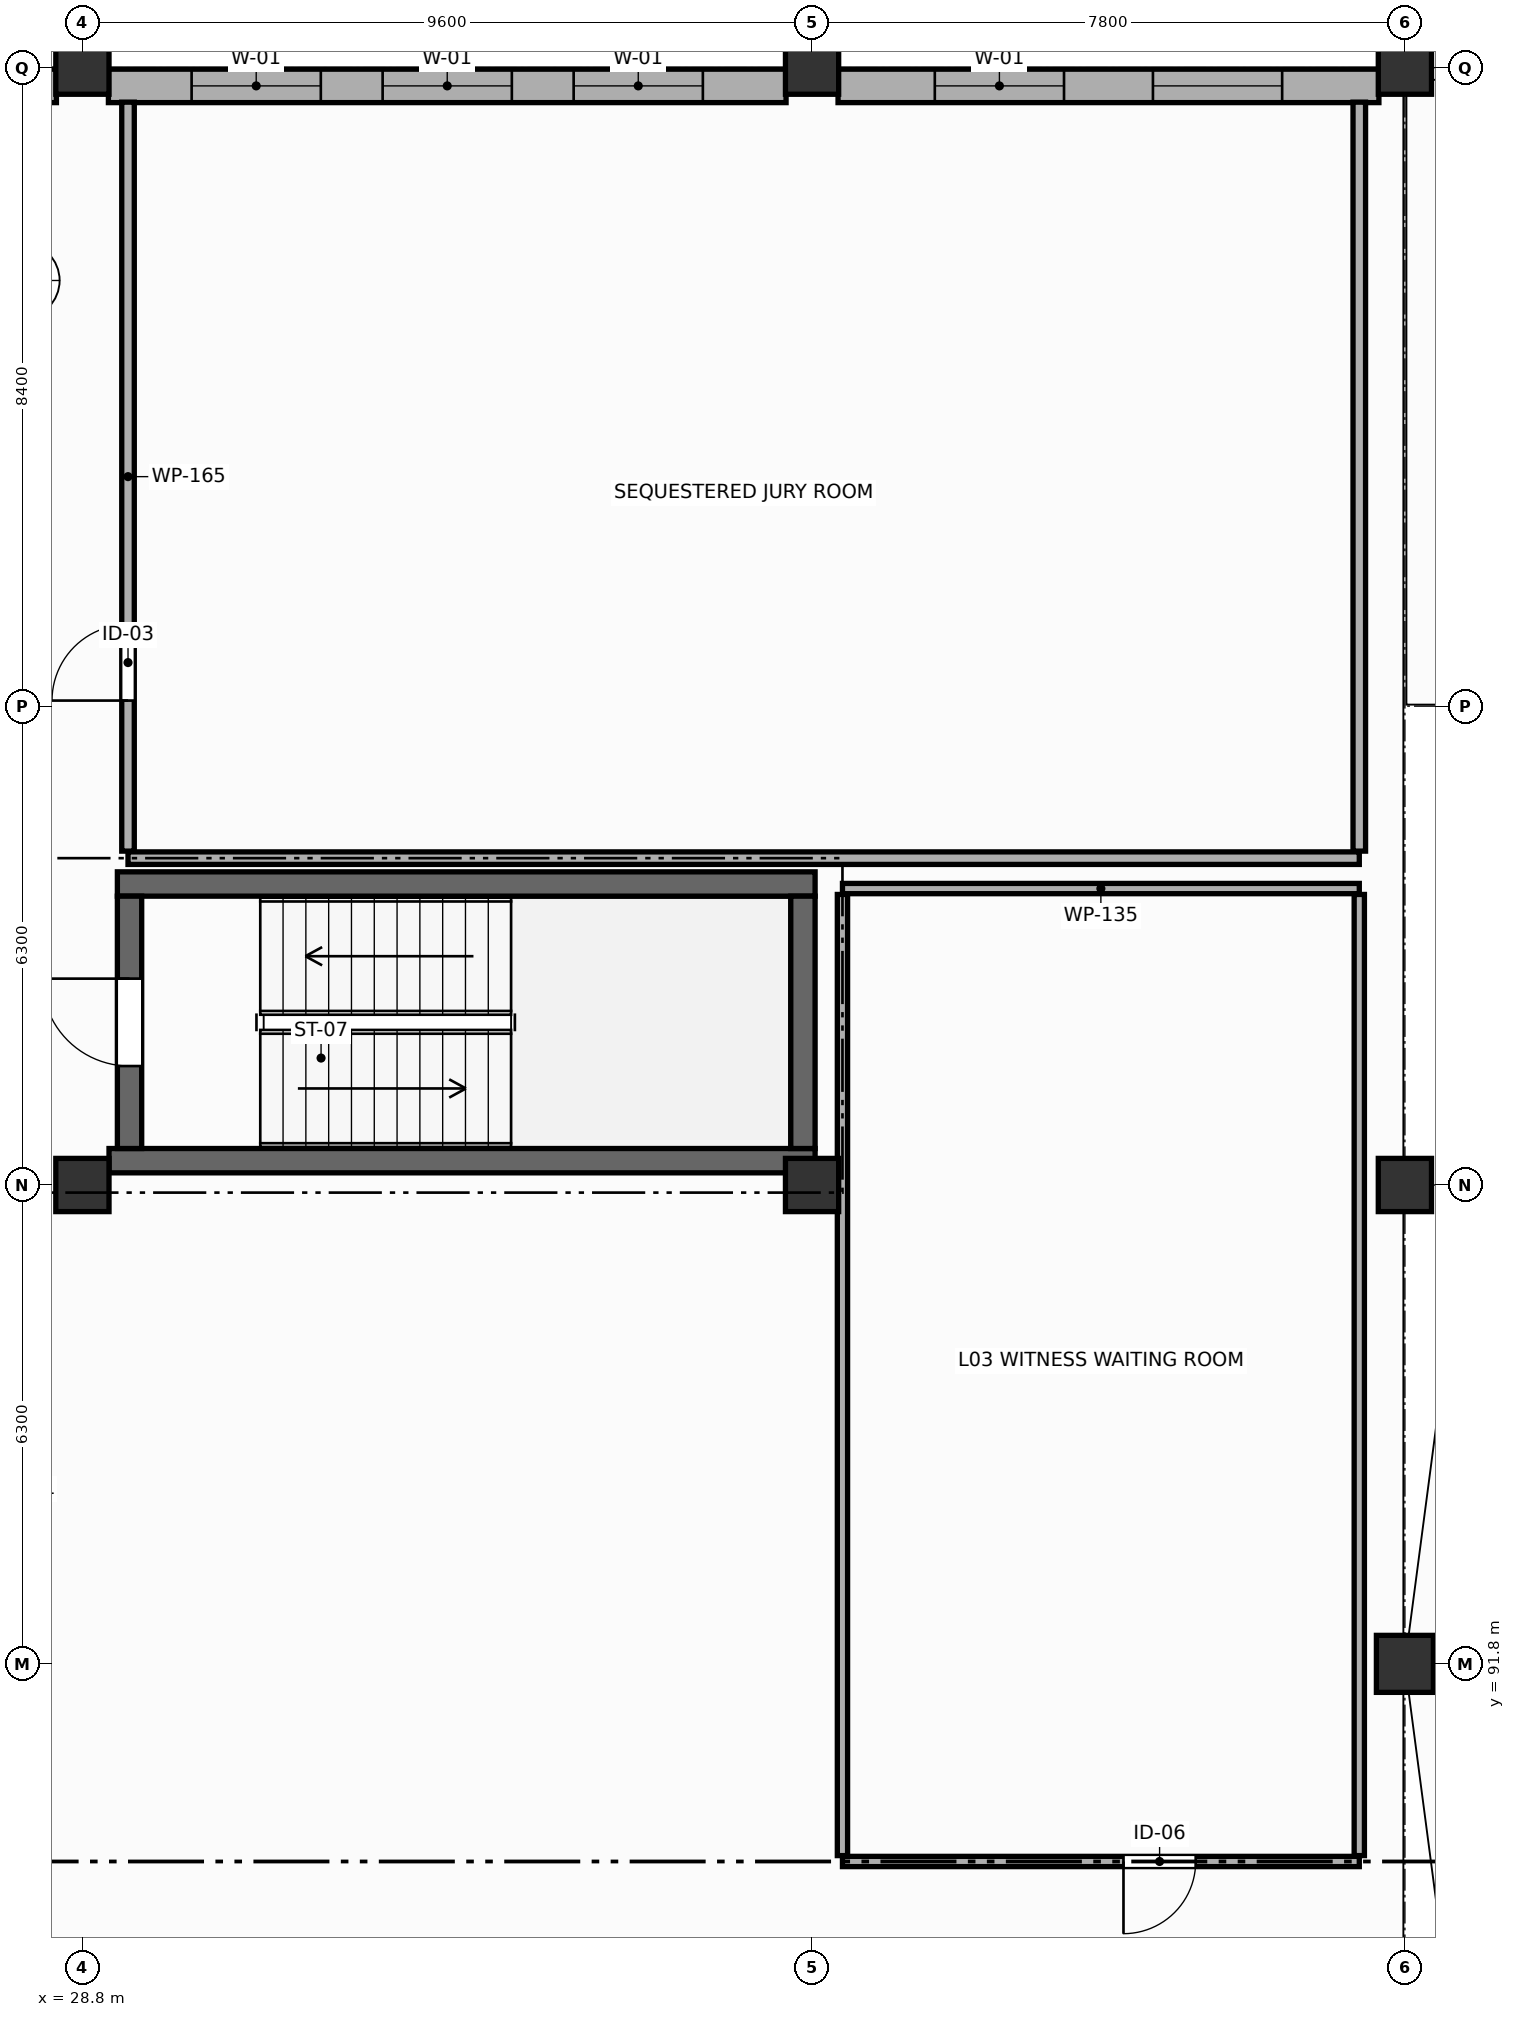
"""IFC4 building model, lengths in metres.
Left out: names, types, materials, properties, quantities, classifications, styles, units other than length and angle.
Written with IfcOpenShell. Run it as: python <this file> out.ifc"""

import sys

from ifc_helpers import new_model, si_unit, direction, frame, frame_2d, origin, origin_2d, place, context, subcontext, project, spatial, rectangle, circle, extrude, element, fill, save


model = new_model("IFC4")
c1 = context("Model", 3, precision=1e-05, world=origin(), true_north=direction((0.0, 1.0)))
c2 = subcontext(c1, "Body", "Model", "MODEL_VIEW")
j1 = project(units=[si_unit("LENGTHUNIT", "METRE"), si_unit("PLANEANGLEUNIT", "RADIAN")], contexts=[c1])
p1 = place(None, origin())
s1 = spatial("IfcSite", under=j1, at=p1, CompositionType="ELEMENT")
p2 = place(p1, origin())
s2 = spatial("IfcBuilding", under=s1, at=p2, CompositionType="ELEMENT")
p3 = place(p2, frame((0.0, 0.0, 9.9)))
s3 = spatial("IfcBuildingStorey", under=s2, at=p3, CompositionType="ELEMENT", Elevation=9.9)
p4 = place(p3, frame((46.2, 91.8, 0.0), z_axis=(0.0, 0.0, 1.0), x_axis=(1.0, 0.0, 0.0)))
e1 = element("IfcColumn", 1, at=p4, inside=s3, PredefinedType="COLUMN", context=c2, shape_type="SweptSolid", body=[
    extrude(circle(Radius=0.375, at=origin_2d()), origin(), (0.0, 0.0, 1.0), 4.5),
])
for number, where, z_axis, x_axis in (
    (2, (28.8, 98.1, 0.0), (0.0, 0.0, 1.0), (1.0, 0.0, 0.0)),
    (3, (28.8, 112.8, 0.0), (0.0, 0.0, 1.0), (1.0, 0.0, 0.0)),
    (4, (38.4, 98.1, 0.0), (0.0, 0.0, 1.0), (1.0, 0.0, 0.0)),
    (5, (38.4, 112.8, 0.0), (0.0, 0.0, 1.0), (1.0, 0.0, 0.0)),
    (6, (46.2, 98.1, 0.0), (0.0, 0.0, 1.0), (1.0, 0.0, 0.0)),
    (7, (46.2, 112.8, 0.0), (0.0, 0.0, 1.0), (1.0, 0.0, 0.0)),
):
    element("IfcColumn", number, at=place(p3, frame(where, z_axis=z_axis, x_axis=x_axis)), inside=s3, PredefinedType="COLUMN", context=c2, shape_type="SweptSolid", body=[
        extrude(rectangle(XDim=0.7, YDim=0.7, at=origin_2d()), origin(), (0.0, 0.0, 1.0), 4.5),
    ])
p5 = place(p3, frame((19.542, 112.56, 0.0), z_axis=(0.0, 0.0, 1.0), x_axis=(1.0, 0.0, 0.0)))
e8 = element("IfcWall", 8, at=p5, inside=s3, PredefinedType="STANDARD", context=c2, shape_type="SweptSolid", body=[
    extrude(rectangle(XDim=8.916, YDim=0.44, at=frame_2d((4.458, 0.0))), origin(), (0.0, 0.0, 1.0), 3.33),
])
p6 = place(p5, frame((1.095, 0.0, 0.85)))
e9 = element("IfcOpeningElement", 9, at=p6, cuts=e8, PredefinedType="OPENING", context=c2, shape_type="SweptSolid", body=[
    extrude(rectangle(XDim=1.7, YDim=2.3, at=frame_2d((0.85, 1.15))), frame((0.0, 0.23, 0.0), z_axis=(0.0, -1.0, 0.0), x_axis=(1.0, 0.0, 0.0)), (0.0, 0.0, 1.0), 0.46),
])
p7 = place(p5, frame((3.608, 0.0, 0.85)))
e10 = element("IfcOpeningElement", 10, at=p7, cuts=e8, PredefinedType="OPENING", context=c2, shape_type="SweptSolid", body=[
    extrude(rectangle(XDim=1.7, YDim=2.3, at=frame_2d((0.85, 1.15))), frame((0.0, 0.23, 0.0), z_axis=(0.0, -1.0, 0.0), x_axis=(1.0, 0.0, 0.0)), (0.0, 0.0, 1.0), 0.46),
])
p8 = place(p5, frame((6.121, 0.0, 0.85)))
e11 = element("IfcOpeningElement", 11, at=p8, cuts=e8, PredefinedType="OPENING", context=c2, shape_type="SweptSolid", body=[
    extrude(rectangle(XDim=1.7, YDim=2.3, at=frame_2d((0.85, 1.15))), frame((0.0, 0.23, 0.0), z_axis=(0.0, -1.0, 0.0), x_axis=(1.0, 0.0, 0.0)), (0.0, 0.0, 1.0), 0.46),
])
p9 = place(p3, frame((29.142, 112.56, 0.0), z_axis=(0.0, 0.0, 1.0), x_axis=(1.0, 0.0, 0.0)))
e12 = element("IfcWall", 12, at=p9, inside=s3, PredefinedType="STANDARD", context=c2, shape_type="SweptSolid", body=[
    extrude(rectangle(XDim=8.916, YDim=0.44, at=frame_2d((4.458, 0.0))), origin(), (0.0, 0.0, 1.0), 3.33),
])
p10 = place(p9, frame((1.095, 0.0, 0.85)))
e13 = element("IfcOpeningElement", 13, at=p10, cuts=e12, PredefinedType="OPENING", context=c2, shape_type="SweptSolid", body=[
    extrude(rectangle(XDim=1.7, YDim=2.3, at=frame_2d((0.85, 1.15))), frame((0.0, 0.23, 0.0), z_axis=(0.0, -1.0, 0.0), x_axis=(1.0, 0.0, 0.0)), (0.0, 0.0, 1.0), 0.46),
])
p11 = place(p9, frame((3.608, 0.0, 0.85)))
e14 = element("IfcOpeningElement", 14, at=p11, cuts=e12, PredefinedType="OPENING", context=c2, shape_type="SweptSolid", body=[
    extrude(rectangle(XDim=1.7, YDim=2.3, at=frame_2d((0.85, 1.15))), frame((0.0, 0.23, 0.0), z_axis=(0.0, -1.0, 0.0), x_axis=(1.0, 0.0, 0.0)), (0.0, 0.0, 1.0), 0.46),
])
p12 = place(p9, frame((6.121, 0.0, 0.85)))
e15 = element("IfcOpeningElement", 15, at=p12, cuts=e12, PredefinedType="OPENING", context=c2, shape_type="SweptSolid", body=[
    extrude(rectangle(XDim=1.7, YDim=2.3, at=frame_2d((0.85, 1.15))), frame((0.0, 0.23, 0.0), z_axis=(0.0, -1.0, 0.0), x_axis=(1.0, 0.0, 0.0)), (0.0, 0.0, 1.0), 0.46),
])
p13 = place(p3, frame((38.742, 112.56, 0.0), z_axis=(0.0, 0.0, 1.0), x_axis=(1.0, 0.0, 0.0)))
e16 = element("IfcWall", 16, at=p13, inside=s3, PredefinedType="STANDARD", context=c2, shape_type="SweptSolid", body=[
    extrude(rectangle(XDim=7.116, YDim=0.44, at=frame_2d((3.558, 0.0))), origin(), (0.0, 0.0, 1.0), 3.33),
])
p14 = place(p13, frame((1.273, 0.0, 0.85)))
e17 = element("IfcOpeningElement", 17, at=p14, cuts=e16, PredefinedType="OPENING", context=c2, shape_type="SweptSolid", body=[
    extrude(rectangle(XDim=1.7, YDim=2.3, at=frame_2d((0.85, 1.15))), frame((0.0, 0.23, 0.0), z_axis=(0.0, -1.0, 0.0), x_axis=(1.0, 0.0, 0.0)), (0.0, 0.0, 1.0), 0.46),
])
p15 = place(p13, frame((4.143, 0.0, 0.85)))
e18 = element("IfcOpeningElement", 18, at=p15, cuts=e16, PredefinedType="OPENING", context=c2, shape_type="SweptSolid", body=[
    extrude(rectangle(XDim=1.7, YDim=2.3, at=frame_2d((0.85, 1.15))), frame((0.0, 0.23, 0.0), z_axis=(0.0, -1.0, 0.0), x_axis=(1.0, 0.0, 0.0)), (0.0, 0.0, 1.0), 0.46),
])
p16 = place(p3, frame((29.26, 102.06, 0.0), z_axis=(0.0, 0.0, 1.0), x_axis=(1.0, 0.0, 0.0)))
e19 = element("IfcWall", 19, at=p16, inside=s3, PredefinedType="SHEAR", context=c2, shape_type="SweptSolid", body=[
    extrude(rectangle(XDim=9.18, YDim=0.32, at=frame_2d((4.59, 0.0))), origin(), (0.0, 0.0, 1.0), 4.25),
])
p17 = place(p3, frame((38.44, 98.42, 0.0), z_axis=(0.0, 0.0, 1.0), x_axis=(-1.0, 0.0, 0.0)))
e20 = element("IfcWall", 20, at=p17, inside=s3, PredefinedType="SHEAR", context=c2, shape_type="SweptSolid", body=[
    extrude(rectangle(XDim=9.29, YDim=0.32, at=frame_2d((4.645, 0.0))), origin(), (0.0, 0.0, 1.0), 4.25),
])
p18 = place(p3, frame((29.42, 98.58, 0.0), z_axis=(0.0, 0.0, 1.0), x_axis=(0.0, 1.0, 0.0)))
e21 = element("IfcWall", 21, at=p18, inside=s3, PredefinedType="SHEAR", context=c2, shape_type="SweptSolid", body=[
    extrude(rectangle(XDim=3.32, YDim=0.32, at=frame_2d((1.66, 0.0))), origin(), (0.0, 0.0, 1.0), 4.25),
])
p19 = place(p18, frame((1.085, 0.0, 0.0)))
e22 = element("IfcOpeningElement", 22, at=p19, cuts=e21, PredefinedType="OPENING", context=c2, shape_type="SweptSolid", body=[
    extrude(rectangle(XDim=1.15, YDim=2.2, at=frame_2d((0.575, 1.1))), frame((0.0, 0.17, 0.0), z_axis=(0.0, -1.0, 0.0), x_axis=(1.0, 0.0, 0.0)), (0.0, 0.0, 1.0), 0.34),
])
p20 = place(p3, frame((38.28, 101.9, 0.0), z_axis=(0.0, 0.0, 1.0), x_axis=(0.0, -1.0, 0.0)))
e23 = element("IfcWall", 23, at=p20, inside=s3, PredefinedType="SHEAR", context=c2, shape_type="SweptSolid", body=[
    extrude(rectangle(XDim=3.32, YDim=0.32, at=frame_2d((1.66, 0.0))), origin(), (0.0, 0.0, 1.0), 4.25),
])
p21 = place(p3, frame((45.6, 102.4, 0.0), z_axis=(0.0, 0.0, 1.0), x_axis=(-1.0, 0.0, 0.0)))
e24 = element("IfcWall", 24, at=p21, inside=s3, PredefinedType="PARTITIONING", context=c2, shape_type="SweptSolid", body=[
    extrude(rectangle(XDim=16.2, YDim=0.165, at=frame_2d((8.1, 0.0))), origin(), (0.0, 0.0, 1.0), 3.33),
])
p22 = place(p3, frame((29.4, 102.492, 0.0), z_axis=(0.0, 0.0, 1.0), x_axis=(0.0, 1.0, 0.0)))
e25 = element("IfcWall", 25, at=p22, inside=s3, PredefinedType="PARTITIONING", context=c2, shape_type="SweptSolid", body=[
    extrude(rectangle(XDim=9.854, YDim=0.165, at=frame_2d((4.927, 0.0))), origin(), (0.0, 0.0, 1.0), 3.63),
])
p23 = place(p22, frame((1.981, 0.0, 0.0)))
e26 = element("IfcOpeningElement", 26, at=p23, cuts=e25, PredefinedType="OPENING", context=c2, shape_type="SweptSolid", body=[
    extrude(rectangle(XDim=1.0, YDim=2.15, at=frame_2d((0.5, 1.075))), frame((0.0, 0.093, 0.0), z_axis=(0.0, -1.0, 0.0), x_axis=(1.0, 0.0, 0.0)), (0.0, 0.0, 1.0), 0.185),
])
p24 = place(p3, frame((45.6, 112.346, 0.0), z_axis=(0.0, 0.0, 1.0), x_axis=(0.0, -1.0, 0.0)))
e27 = element("IfcWall", 27, at=p24, inside=s3, PredefinedType="PARTITIONING", context=c2, shape_type="SweptSolid", body=[
    extrude(rectangle(XDim=9.854, YDim=0.165, at=frame_2d((4.927, 0.0))), origin(), (0.0, 0.0, 1.0), 3.63),
])
p25 = place(p3, frame((38.8, 102.0, 0.0), z_axis=(0.0, 0.0, 1.0), x_axis=(1.0, 0.0, 0.0)))
e28 = element("IfcWall", 28, at=p25, inside=s3, PredefinedType="PARTITIONING", context=c2, shape_type="SweptSolid", body=[
    extrude(rectangle(XDim=6.8, YDim=0.135, at=frame_2d((3.4, 0.0))), origin(), (0.0, 0.0, 1.0), 3.33),
])
p26 = place(p3, frame((45.6, 89.2, 0.0), z_axis=(0.0, 0.0, 1.0), x_axis=(-1.0, 0.0, 0.0)))
e29 = element("IfcWall", 29, at=p26, inside=s3, PredefinedType="PARTITIONING", context=c2, shape_type="SweptSolid", body=[
    extrude(rectangle(XDim=6.8, YDim=0.135, at=frame_2d((3.4, 0.0))), origin(), (0.0, 0.0, 1.0), 3.38),
])
p27 = place(p26, frame((2.153, 0.0, 0.0)))
e30 = element("IfcOpeningElement", 30, at=p27, cuts=e29, PredefinedType="OPENING", context=c2, shape_type="SweptSolid", body=[
    extrude(rectangle(XDim=0.95, YDim=2.15, at=frame_2d((0.475, 1.075))), frame((0.0, 0.077, 0.0), z_axis=(0.0, -1.0, 0.0), x_axis=(1.0, 0.0, 0.0)), (0.0, 0.0, 1.0), 0.155),
])
p28 = place(p3, frame((38.8, 89.278, 0.0), z_axis=(0.0, 0.0, 1.0), x_axis=(0.0, 1.0, 0.0)))
e31 = element("IfcWall", 31, at=p28, inside=s3, PredefinedType="PARTITIONING", context=c2, shape_type="SweptSolid", body=[
    extrude(rectangle(XDim=12.645, YDim=0.135, at=frame_2d((6.323, 0.0))), origin(), (0.0, 0.0, 1.0), 3.33),
])
p29 = place(p3, frame((45.6, 101.923, 0.0), z_axis=(0.0, 0.0, 1.0), x_axis=(0.0, -1.0, 0.0)))
e32 = element("IfcWall", 32, at=p29, inside=s3, PredefinedType="PARTITIONING", context=c2, shape_type="SweptSolid", body=[
    extrude(rectangle(XDim=12.645, YDim=0.135, at=frame_2d((6.323, 0.0))), origin(), (0.0, 0.0, 1.0), 3.63),
])
p30 = place(p10, origin())
e33 = element("IfcWindow", 33, at=p30, inside=s3, PartitioningType="SINGLE_PANEL", PredefinedType="WINDOW", context=c2, shape_type="SweptSolid", body=[
    extrude(rectangle(XDim=1.7, YDim=2.3, at=frame_2d((0.85, 1.15))), frame((0.0, 0.03, 0.0), z_axis=(0.0, -1.0, 0.0), x_axis=(1.0, 0.0, 0.0)), (0.0, 0.0, 1.0), 0.06),
])
fill(e13, e33)
p31 = place(p11, origin())
e34 = element("IfcWindow", 34, at=p31, inside=s3, PartitioningType="SINGLE_PANEL", PredefinedType="WINDOW", context=c2, shape_type="SweptSolid", body=[
    extrude(rectangle(XDim=1.7, YDim=2.3, at=frame_2d((0.85, 1.15))), frame((0.0, 0.03, 0.0), z_axis=(0.0, -1.0, 0.0), x_axis=(1.0, 0.0, 0.0)), (0.0, 0.0, 1.0), 0.06),
])
fill(e14, e34)
p32 = place(p12, origin())
e35 = element("IfcWindow", 35, at=p32, inside=s3, PartitioningType="SINGLE_PANEL", PredefinedType="WINDOW", context=c2, shape_type="SweptSolid", body=[
    extrude(rectangle(XDim=1.7, YDim=2.3, at=frame_2d((0.85, 1.15))), frame((0.0, 0.03, 0.0), z_axis=(0.0, -1.0, 0.0), x_axis=(1.0, 0.0, 0.0)), (0.0, 0.0, 1.0), 0.06),
])
fill(e15, e35)
p33 = place(p14, origin())
e36 = element("IfcWindow", 36, at=p33, inside=s3, PartitioningType="SINGLE_PANEL", PredefinedType="WINDOW", context=c2, shape_type="SweptSolid", body=[
    extrude(rectangle(XDim=1.7, YDim=2.3, at=frame_2d((0.85, 1.15))), frame((0.0, 0.03, 0.0), z_axis=(0.0, -1.0, 0.0), x_axis=(1.0, 0.0, 0.0)), (0.0, 0.0, 1.0), 0.06),
])
fill(e17, e36)
p34 = place(p15, origin())
e37 = element("IfcWindow", 37, at=p34, inside=s3, PartitioningType="SINGLE_PANEL", PredefinedType="WINDOW", context=c2, shape_type="SweptSolid", body=[
    extrude(rectangle(XDim=1.7, YDim=2.3, at=frame_2d((0.85, 1.15))), frame((0.0, 0.03, 0.0), z_axis=(0.0, -1.0, 0.0), x_axis=(1.0, 0.0, 0.0)), (0.0, 0.0, 1.0), 0.06),
])
fill(e18, e37)
p35 = place(p19, origin())
e38 = element("IfcDoor", 38, at=p35, inside=s3, OperationType="SINGLE_SWING_RIGHT", PredefinedType="DOOR", context=c2, shape_type="SweptSolid", body=[
    extrude(rectangle(XDim=1.15, YDim=2.2, at=frame_2d((0.575, 1.1))), frame((0.0, 0.025, 0.0), z_axis=(0.0, -1.0, 0.0), x_axis=(1.0, 0.0, 0.0)), (0.0, 0.0, 1.0), 0.05),
])
fill(e22, e38)
p36 = place(p23, origin())
e39 = element("IfcDoor", 39, at=p36, inside=s3, OperationType="SINGLE_SWING_LEFT", PredefinedType="DOOR", context=c2, shape_type="SweptSolid", body=[
    extrude(rectangle(XDim=1.0, YDim=2.15, at=frame_2d((0.5, 1.075))), frame((0.0, 0.025, 0.0), z_axis=(0.0, -1.0, 0.0), x_axis=(1.0, 0.0, 0.0)), (0.0, 0.0, 1.0), 0.05),
])
fill(e26, e39)
p37 = place(p27, origin())
e40 = element("IfcDoor", 40, at=p37, inside=s3, OperationType="SINGLE_SWING_RIGHT", PredefinedType="DOOR", context=c2, shape_type="SweptSolid", body=[
    extrude(rectangle(XDim=0.95, YDim=2.15, at=frame_2d((0.475, 1.075))), frame((0.0, 0.025, 0.0), z_axis=(0.0, -1.0, 0.0), x_axis=(1.0, 0.0, 0.0)), (0.0, 0.0, 1.0), 0.05),
])
fill(e30, e40)
save(model, sys.argv[1])
